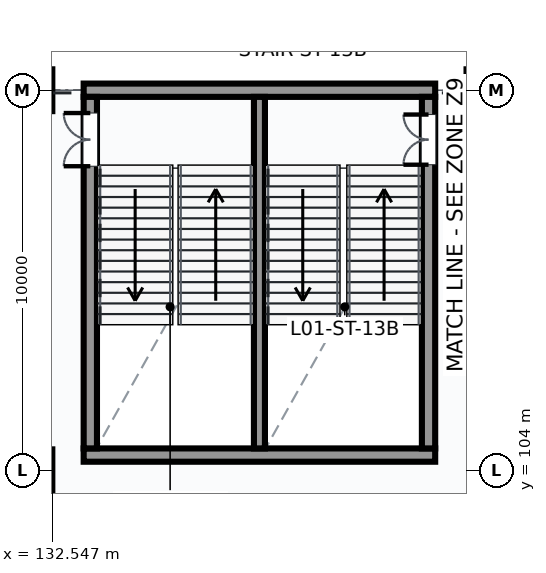
"""IFC4 building model, lengths in metres.
Left out: names, types, materials, properties, quantities, classifications, styles, units other than length and angle.
Written with IfcOpenShell. Run it as: python <this file> out.ifc"""

import sys

from ifc_helpers import new_model, si_unit, direction, frame, frame_2d, origin, place, context, subcontext, project, spatial, rectangle, extrude, element, fill, save


model = new_model("IFC4")
c1 = context("Model", 3, precision=1e-05, world=origin(), true_north=direction((0.0, 1.0)))
c2 = subcontext(c1, "Body", "Model", "MODEL_VIEW")
j1 = project(units=[si_unit("LENGTHUNIT", "METRE"), si_unit("PLANEANGLEUNIT", "RADIAN")], contexts=[c1])
p1 = place(None, origin())
s1 = spatial("IfcSite", under=j1, at=p1, CompositionType="ELEMENT")
p2 = place(p1, origin())
s2 = spatial("IfcBuilding", under=s1, at=p2, CompositionType="ELEMENT")
p3 = place(p2, frame((0.0, 0.0, 5.4)))
s3 = spatial("IfcBuildingStorey", under=s2, at=p3, CompositionType="ELEMENT", Elevation=5.4)
p4 = place(p3, frame((133.375, 104.4, 0.0), z_axis=(0.0, 0.0, 1.0), x_axis=(1.0, 0.0, 0.0)))
e1 = element("IfcWall", 1, at=p4, inside=s3, PredefinedType="SHEAR", context=c2, shape_type="SweptSolid", body=[
    extrude(rectangle(XDim=9.25, YDim=0.35, at=frame_2d((4.625, 0.0))), origin(), (0.0, 0.0, 1.0), 4.8),
])
p5 = place(p3, frame((133.375, 114.0, 0.0), z_axis=(0.0, 0.0, 1.0), x_axis=(1.0, 0.0, 0.0)))
e2 = element("IfcWall", 2, at=p5, inside=s3, PredefinedType="SHEAR", context=c2, shape_type="SweptSolid", body=[
    extrude(rectangle(XDim=9.25, YDim=0.35, at=frame_2d((4.625, 0.0))), origin(), (0.0, 0.0, 1.0), 3.906),
])
p6 = place(p3, frame((133.55, 104.575, 0.0), z_axis=(0.0, 0.0, 1.0), x_axis=(0.0, 1.0, 0.0)))
e3 = element("IfcWall", 3, at=p6, inside=s3, PredefinedType="SHEAR", context=c2, shape_type="SweptSolid", body=[
    extrude(rectangle(XDim=9.25, YDim=0.35, at=frame_2d((4.625, 0.0))), origin(), (0.0, 0.0, 1.0), 4.8),
])
p7 = place(p6, frame((7.425, 0.0, 0.0)))
e4 = element("IfcOpeningElement", 4, at=p7, cuts=e3, PredefinedType="OPENING", context=c2, shape_type="SweptSolid", body=[
    extrude(rectangle(XDim=1.4, YDim=2.2, at=frame_2d((0.7, 1.1))), frame((0.0, 0.185, 0.0), z_axis=(0.0, -1.0, 0.0), x_axis=(1.0, 0.0, 0.0)), (0.0, 0.0, 1.0), 0.37),
])
p8 = place(p3, frame((142.45, 104.575, 0.0), z_axis=(0.0, 0.0, 1.0), x_axis=(0.0, 1.0, 0.0)))
e5 = element("IfcWall", 5, at=p8, inside=s3, PredefinedType="SHEAR", context=c2, shape_type="SweptSolid", body=[
    extrude(rectangle(XDim=9.25, YDim=0.35, at=frame_2d((4.625, 0.0))), origin(), (0.0, 0.0, 1.0), 4.8),
])
p9 = place(p8, frame((7.465, 0.0, 0.0)))
e6 = element("IfcOpeningElement", 6, at=p9, cuts=e5, PredefinedType="OPENING", context=c2, shape_type="SweptSolid", body=[
    extrude(rectangle(XDim=1.32, YDim=2.2, at=frame_2d((0.66, 1.1))), frame((0.0, 0.185, 0.0), z_axis=(0.0, -1.0, 0.0), x_axis=(1.0, 0.0, 0.0)), (0.0, 0.0, 1.0), 0.37),
])
p10 = place(p3, frame((138.0, 104.575, 0.0), z_axis=(0.0, 0.0, 1.0), x_axis=(0.0, 1.0, 0.0)))
e7 = element("IfcWall", 7, at=p10, inside=s3, PredefinedType="SHEAR", context=c2, shape_type="SweptSolid", body=[
    extrude(rectangle(XDim=9.25, YDim=0.29, at=frame_2d((4.625, 0.0))), origin(), (0.0, 0.0, 1.0), 4.8),
])
p11 = place(p7, frame((1.4, 0.0, 0.0), z_axis=(0.0, 0.0, 1.0), x_axis=(-1.0, 0.0, 0.0)))
e8 = element("IfcDoor", 8, at=p11, inside=s3, OperationType="DOUBLE_DOOR_SINGLE_SWING", PredefinedType="DOOR", context=c2, shape_type="SweptSolid", body=[
    extrude(rectangle(XDim=1.4, YDim=2.2, at=frame_2d((0.7, 1.1))), frame((0.0, 0.025, 0.0), z_axis=(0.0, -1.0, 0.0), x_axis=(1.0, 0.0, 0.0)), (0.0, 0.0, 1.0), 0.05),
])
fill(e4, e8)
p12 = place(p9, origin())
e9 = element("IfcDoor", 9, at=p12, inside=s3, OperationType="DOUBLE_DOOR_SINGLE_SWING", PredefinedType="DOOR", context=c2, shape_type="SweptSolid", body=[
    extrude(rectangle(XDim=1.32, YDim=2.2, at=frame_2d((0.66, 1.1))), frame((0.0, 0.025, 0.0), z_axis=(0.0, -1.0, 0.0), x_axis=(1.0, 0.0, 0.0)), (0.0, 0.0, 1.0), 0.05),
])
fill(e6, e9)
save(model, sys.argv[1])
